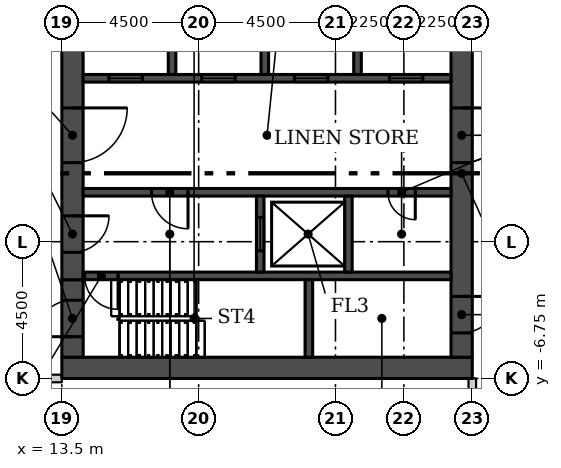
"""IFC4 building model, lengths in metres.
Left out: names, types, materials, properties, quantities, classifications, styles, units other than length and angle.
Written with IfcOpenShell. Run it as: python <this file> out.ifc"""

import sys

from ifc_helpers import new_model, si_unit, direction, frame, frame_2d, origin, place, context, subcontext, project, spatial, rectangle, extrude, element, fill, save


model = new_model("IFC4")
c1 = context("Model", 3, precision=1e-05, world=origin(), true_north=direction((0.0, 1.0)))
c2 = subcontext(c1, "Body", "Model", "MODEL_VIEW")
j1 = project(units=[si_unit("LENGTHUNIT", "METRE"), si_unit("PLANEANGLEUNIT", "RADIAN")], contexts=[c1])
p1 = place(None, origin())
s1 = spatial("IfcSite", under=j1, at=p1, CompositionType="ELEMENT")
p2 = place(p1, origin())
s2 = spatial("IfcBuilding", under=s1, at=p2, CompositionType="ELEMENT")
p3 = place(p2, origin())
s3 = spatial("IfcBuildingStorey", under=s2, at=p3, CompositionType="ELEMENT", Elevation=0.0)
p4 = place(p3, frame((27.0, -6.75, 0.0), z_axis=(0.0, 0.0, 1.0), x_axis=(0.0, -1.0, 0.0)))
e1 = element("IfcWall", 1, at=p4, inside=s3, PredefinedType="PARTITIONING", context=c2, shape_type="SweptSolid", body=[
    extrude(rectangle(XDim=22.375, YDim=0.25, at=frame_2d((11.188, 0.0))), origin(), (0.0, 0.0, 1.0), 12.1),
])
p5 = place(p4, frame((10.05, 0.0, 0.0)))
e2 = element("IfcOpeningElement", 2, at=p5, cuts=e1, PredefinedType="OPENING", context=c2, shape_type="SweptSolid", body=[
    extrude(rectangle(XDim=1.8, YDim=2.4, at=frame_2d((0.9, 1.2))), frame((0.0, 0.135, 0.0), z_axis=(0.0, -1.0, 0.0), x_axis=(1.0, 0.0, 0.0)), (0.0, 0.0, 1.0), 0.27),
])
p6 = place(p3, frame((-13.5, -6.75, 0.0)))
e3 = element("IfcWall", 3, at=p6, inside=s3, PredefinedType="PARTITIONING", context=c2, shape_type="SweptSolid", body=[
    extrude(rectangle(XDim=27.0, YDim=0.25, at=frame_2d((13.5, 0.0))), origin(), (0.0, 0.0, 1.0), 12.1),
])
p7 = place(p6, frame((14.25, 0.0, 0.0)))
e4 = element("IfcOpeningElement", 4, at=p7, cuts=e3, PredefinedType="OPENING", context=c2, shape_type="SweptSolid", body=[
    extrude(rectangle(XDim=1.8, YDim=2.4, at=frame_2d((0.9, 1.2))), frame((0.0, 0.135, 0.0), z_axis=(0.0, -1.0, 0.0), x_axis=(1.0, 0.0, 0.0)), (0.0, 0.0, 1.0), 0.27),
])
p8 = place(p3, frame((13.5, -6.4, 0.0)))
e5 = element("IfcWall", 5, at=p8, inside=s3, PredefinedType="SHEAR", context=c2, shape_type="SweptSolid", body=[
    extrude(rectangle(XDim=13.5, YDim=0.7, at=frame_2d((6.75, 0.0))), origin(), (0.0, 0.0, 1.0), 6.1),
])
p9 = place(p3, frame((13.85, -6.05, 0.0), z_axis=(0.0, 0.0, 1.0), x_axis=(0.0, 1.0, 0.0)))
e6 = element("IfcWall", 6, at=p9, inside=s3, PredefinedType="SHEAR", context=c2, shape_type="SweptSolid", body=[
    extrude(rectangle(XDim=2.55, YDim=0.7, at=frame_2d((1.275, 0.0))), origin(), (0.0, 0.0, 1.0), 6.1),
])
p10 = place(p9, frame((0.675, 0.0, 0.0)))
e7 = element("IfcOpeningElement", 7, at=p10, cuts=e6, PredefinedType="OPENING", context=c2, shape_type="SweptSolid", body=[
    extrude(rectangle(XDim=1.2, YDim=2.4, at=frame_2d((0.6, 1.2))), frame((0.0, 0.36, 0.0), z_axis=(0.0, -1.0, 0.0), x_axis=(1.0, 0.0, 0.0)), (0.0, 0.0, 1.0), 0.72),
])
p11 = place(p3, frame((13.85, 6.05, 0.0), z_axis=(0.0, 0.0, 1.0), x_axis=(0.0, -1.0, 0.0)))
e8 = element("IfcWall", 8, at=p11, inside=s3, PredefinedType="SHEAR", context=c2, shape_type="SweptSolid", body=[
    extrude(rectangle(XDim=9.55, YDim=0.7, at=frame_2d((4.775, 0.0))), origin(), (0.0, 0.0, 1.0), 6.1),
])
p12 = place(p11, frame((7.45, 0.0, 0.0)))
e9 = element("IfcOpeningElement", 9, at=p12, cuts=e8, PredefinedType="OPENING", context=c2, shape_type="SweptSolid", body=[
    extrude(rectangle(XDim=1.2, YDim=2.1, at=frame_2d((0.6, 1.05))), frame((0.0, 0.36, 0.0), z_axis=(0.0, -1.0, 0.0), x_axis=(1.0, 0.0, 0.0)), (0.0, 0.0, 1.0), 0.72),
])
p13 = place(p11, frame((3.9, 0.0, 0.0)))
e10 = element("IfcOpeningElement", 10, at=p13, cuts=e8, PredefinedType="OPENING", context=c2, shape_type="SweptSolid", body=[
    extrude(rectangle(XDim=1.8, YDim=2.4, at=frame_2d((0.9, 1.2))), frame((0.0, 0.36, 0.0), z_axis=(0.0, -1.0, 0.0), x_axis=(1.0, 0.0, 0.0)), (0.0, 0.0, 1.0), 0.72),
])
p14 = place(p3, frame((26.65, 6.05, 0.0), z_axis=(0.0, 0.0, 1.0), x_axis=(0.0, -1.0, 0.0)))
e11 = element("IfcWall", 11, at=p14, inside=s3, PredefinedType="SHEAR", context=c2, shape_type="SweptSolid", body=[
    extrude(rectangle(XDim=12.1, YDim=0.7, at=frame_2d((6.05, 0.0))), origin(), (0.0, 0.0, 1.0), 6.1),
])
p15 = place(p14, frame((10.1, 0.0, 0.0)))
e12 = element("IfcOpeningElement", 12, at=p15, cuts=e11, PredefinedType="OPENING", context=c2, shape_type="SweptSolid", body=[
    extrude(rectangle(XDim=1.2, YDim=2.1, at=frame_2d((0.6, 1.05))), frame((0.0, 0.36, 0.0), z_axis=(0.0, -1.0, 0.0), x_axis=(1.0, 0.0, 0.0)), (0.0, 0.0, 1.0), 0.72),
])
p16 = place(p14, frame((3.9, 0.0, 0.0)))
e13 = element("IfcOpeningElement", 13, at=p16, cuts=e11, PredefinedType="OPENING", context=c2, shape_type="SweptSolid", body=[
    extrude(rectangle(XDim=1.8, YDim=2.4, at=frame_2d((0.9, 1.2))), frame((0.0, 0.36, 0.0), z_axis=(0.0, -1.0, 0.0), x_axis=(1.0, 0.0, 0.0)), (0.0, 0.0, 1.0), 0.72),
])
p17 = place(p3, frame((26.3, -3.375, 0.0), z_axis=(0.0, 0.0, 1.0), x_axis=(-1.0, 0.0, 0.0)))
e14 = element("IfcWall", 14, at=p17, inside=s3, PredefinedType="SHEAR", context=c2, shape_type="SweptSolid", body=[
    extrude(rectangle(XDim=12.1, YDim=0.25, at=frame_2d((6.05, 0.0))), origin(), (0.0, 0.0, 1.0), 6.1),
])
p18 = place(p17, frame((10.95, 0.0, 0.0)))
e15 = element("IfcOpeningElement", 15, at=p18, cuts=e14, PredefinedType="OPENING", context=c2, shape_type="SweptSolid", body=[
    extrude(rectangle(XDim=1.1, YDim=2.1, at=frame_2d((0.55, 1.05))), frame((0.0, 0.135, 0.0), z_axis=(0.0, -1.0, 0.0), x_axis=(1.0, 0.0, 0.0)), (0.0, 0.0, 1.0), 0.27),
])
p19 = place(p3, frame((21.625, -6.05, 0.0), z_axis=(0.0, 0.0, 1.0), x_axis=(0.0, 1.0, 0.0)))
e16 = element("IfcWall", 16, at=p19, inside=s3, PredefinedType="SHEAR", context=c2, shape_type="SweptSolid", body=[
    extrude(rectangle(XDim=2.55, YDim=0.25, at=frame_2d((1.275, 0.0))), origin(), (0.0, 0.0, 1.0), 6.1),
])
p20 = place(p3, frame((26.3, -0.625, 0.0), z_axis=(0.0, 0.0, 1.0), x_axis=(-1.0, 0.0, 0.0)))
e17 = element("IfcWall", 17, at=p20, inside=s3, PredefinedType="SHEAR", context=c2, shape_type="SweptSolid", body=[
    extrude(rectangle(XDim=12.1, YDim=0.25, at=frame_2d((6.05, 0.0))), origin(), (0.0, 0.0, 1.0), 6.1),
])
p21 = place(p20, frame((8.65, 0.0, 0.0)))
e18 = element("IfcOpeningElement", 18, at=p21, cuts=e17, PredefinedType="OPENING", context=c2, shape_type="SweptSolid", body=[
    extrude(rectangle(XDim=1.2, YDim=2.1, at=frame_2d((0.6, 1.05))), frame((0.0, 0.135, 0.0), z_axis=(0.0, -1.0, 0.0), x_axis=(1.0, 0.0, 0.0)), (0.0, 0.0, 1.0), 0.27),
])
p22 = place(p20, frame((1.175, 0.0, 0.0)))
e19 = element("IfcOpeningElement", 19, at=p22, cuts=e17, PredefinedType="OPENING", context=c2, shape_type="SweptSolid", body=[
    extrude(rectangle(XDim=0.9, YDim=2.1, at=frame_2d((0.45, 1.05))), frame((0.0, 0.135, 0.0), z_axis=(0.0, -1.0, 0.0), x_axis=(1.0, 0.0, 0.0)), (0.0, 0.0, 1.0), 0.27),
])
p23 = place(p3, frame((20.025, -3.25, 0.0), z_axis=(0.0, 0.0, 1.0), x_axis=(0.0, 1.0, 0.0)))
e20 = element("IfcWall", 20, at=p23, inside=s3, PredefinedType="SHEAR", context=c2, shape_type="SweptSolid", body=[
    extrude(rectangle(XDim=2.5, YDim=0.25, at=frame_2d((1.25, 0.0))), origin(), (0.0, 0.0, 1.0), 6.1),
])
p24 = place(p23, frame((0.7, 0.0, 0.0)))
e21 = element("IfcOpeningElement", 21, at=p24, cuts=e20, PredefinedType="OPENING", context=c2, shape_type="SweptSolid", body=[
    extrude(rectangle(XDim=1.1, YDim=2.1, at=frame_2d((0.55, 1.05))), frame((0.0, 0.135, 0.0), z_axis=(0.0, -1.0, 0.0), x_axis=(1.0, 0.0, 0.0)), (0.0, 0.0, 1.0), 0.27),
])
p25 = place(p3, frame((22.925, -3.25, 0.0), z_axis=(0.0, 0.0, 1.0), x_axis=(0.0, 1.0, 0.0)))
e22 = element("IfcWall", 22, at=p25, inside=s3, PredefinedType="SHEAR", context=c2, shape_type="SweptSolid", body=[
    extrude(rectangle(XDim=2.5, YDim=0.25, at=frame_2d((1.25, 0.0))), origin(), (0.0, 0.0, 1.0), 6.1),
])
p26 = place(p3, frame((14.2, 3.125, 0.0)))
e23 = element("IfcWall", 23, at=p26, inside=s3, PredefinedType="SHEAR", context=c2, shape_type="SweptSolid", body=[
    extrude(rectangle(XDim=12.1, YDim=0.25, at=frame_2d((6.05, 0.0))), origin(), (0.0, 0.0, 1.0), 6.1),
])
p27 = place(p26, frame((0.85, 0.0, 0.0)))
e24 = element("IfcOpeningElement", 24, at=p27, cuts=e23, PredefinedType="OPENING", context=c2, shape_type="SweptSolid", body=[
    extrude(rectangle(XDim=1.1, YDim=2.1, at=frame_2d((0.55, 1.05))), frame((0.0, 0.135, 0.0), z_axis=(0.0, -1.0, 0.0), x_axis=(1.0, 0.0, 0.0)), (0.0, 0.0, 1.0), 0.27),
])
p28 = place(p26, frame((3.9, 0.0, 0.0)))
e25 = element("IfcOpeningElement", 25, at=p28, cuts=e23, PredefinedType="OPENING", context=c2, shape_type="SweptSolid", body=[
    extrude(rectangle(XDim=1.1, YDim=2.1, at=frame_2d((0.55, 1.05))), frame((0.0, 0.135, 0.0), z_axis=(0.0, -1.0, 0.0), x_axis=(1.0, 0.0, 0.0)), (0.0, 0.0, 1.0), 0.27),
])
p29 = place(p26, frame((6.95, 0.0, 0.0)))
e26 = element("IfcOpeningElement", 26, at=p29, cuts=e23, PredefinedType="OPENING", context=c2, shape_type="SweptSolid", body=[
    extrude(rectangle(XDim=1.1, YDim=2.1, at=frame_2d((0.55, 1.05))), frame((0.0, 0.135, 0.0), z_axis=(0.0, -1.0, 0.0), x_axis=(1.0, 0.0, 0.0)), (0.0, 0.0, 1.0), 0.27),
])
p30 = place(p26, frame((10.075, 0.0, 0.0)))
e27 = element("IfcOpeningElement", 27, at=p30, cuts=e23, PredefinedType="OPENING", context=c2, shape_type="SweptSolid", body=[
    extrude(rectangle(XDim=1.1, YDim=2.1, at=frame_2d((0.55, 1.05))), frame((0.0, 0.135, 0.0), z_axis=(0.0, -1.0, 0.0), x_axis=(1.0, 0.0, 0.0)), (0.0, 0.0, 1.0), 0.27),
])
for number, where, z_axis, x_axis in (
    (28, (17.125, 3.25, 0.0), (0.0, 0.0, 1.0), (0.0, 1.0, 0.0)),
    (29, (20.175, 3.25, 0.0), (0.0, 0.0, 1.0), (0.0, 1.0, 0.0)),
    (30, (23.225, 3.25, 0.0), (0.0, 0.0, 1.0), (0.0, 1.0, 0.0)),
):
    element("IfcWall", number, at=place(p3, frame(where, z_axis=z_axis, x_axis=x_axis)), inside=s3, PredefinedType="SHEAR", context=c2, shape_type="SweptSolid", body=[
        extrude(rectangle(XDim=2.8, YDim=0.25, at=frame_2d((1.4, 0.0))), origin(), (0.0, 0.0, 1.0), 6.1),
    ])
p31 = place(p10, origin())
e31 = element("IfcDoor", 31, at=p31, inside=s3, OperationType="SINGLE_SWING_LEFT", PredefinedType="DOOR", context=c2, shape_type="SweptSolid", body=[
    extrude(rectangle(XDim=1.2, YDim=2.4, at=frame_2d((0.6, 1.2))), frame((0.0, 0.025, 0.0), z_axis=(0.0, -1.0, 0.0), x_axis=(1.0, 0.0, 0.0)), (0.0, 0.0, 1.0), 0.05),
])
fill(e7, e31)
p32 = place(p12, origin())
e32 = element("IfcDoor", 32, at=p32, inside=s3, OperationType="SINGLE_SWING_RIGHT", PredefinedType="DOOR", context=c2, shape_type="SweptSolid", body=[
    extrude(rectangle(XDim=1.2, YDim=2.1, at=frame_2d((0.6, 1.05))), frame((0.0, 0.025, 0.0), z_axis=(0.0, -1.0, 0.0), x_axis=(1.0, 0.0, 0.0)), (0.0, 0.0, 1.0), 0.05),
])
fill(e9, e32)
p33 = place(p13, origin())
e33 = element("IfcDoor", 33, at=p33, inside=s3, OperationType="DOUBLE_DOOR_SINGLE_SWING", PredefinedType="DOOR", context=c2, shape_type="SweptSolid", body=[
    extrude(rectangle(XDim=1.8, YDim=2.4, at=frame_2d((0.9, 1.2))), frame((0.0, 0.025, 0.0), z_axis=(0.0, -1.0, 0.0), x_axis=(1.0, 0.0, 0.0)), (0.0, 0.0, 1.0), 0.05),
])
fill(e10, e33)
p34 = place(p15, origin())
e34 = element("IfcDoor", 34, at=p34, inside=s3, OperationType="SINGLE_SWING_RIGHT", PredefinedType="DOOR", context=c2, shape_type="SweptSolid", body=[
    extrude(rectangle(XDim=1.2, YDim=2.1, at=frame_2d((0.6, 1.05))), frame((0.0, 0.025, 0.0), z_axis=(0.0, -1.0, 0.0), x_axis=(1.0, 0.0, 0.0)), (0.0, 0.0, 1.0), 0.05),
])
fill(e12, e34)
p35 = place(p16, origin())
e35 = element("IfcDoor", 35, at=p35, inside=s3, OperationType="DOUBLE_DOOR_SINGLE_SWING", PredefinedType="DOOR", context=c2, shape_type="SweptSolid", body=[
    extrude(rectangle(XDim=1.8, YDim=2.4, at=frame_2d((0.9, 1.2))), frame((0.0, 0.025, 0.0), z_axis=(0.0, -1.0, 0.0), x_axis=(1.0, 0.0, 0.0)), (0.0, 0.0, 1.0), 0.05),
])
fill(e13, e35)
p36 = place(p18, origin())
e36 = element("IfcDoor", 36, at=p36, inside=s3, OperationType="SINGLE_SWING_RIGHT", PredefinedType="DOOR", context=c2, shape_type="SweptSolid", body=[
    extrude(rectangle(XDim=1.1, YDim=2.1, at=frame_2d((0.55, 1.05))), frame((0.0, 0.025, 0.0), z_axis=(0.0, -1.0, 0.0), x_axis=(1.0, 0.0, 0.0)), (0.0, 0.0, 1.0), 0.05),
])
fill(e15, e36)
p37 = place(p21, origin())
e37 = element("IfcDoor", 37, at=p37, inside=s3, OperationType="SINGLE_SWING_RIGHT", PredefinedType="DOOR", context=c2, shape_type="SweptSolid", body=[
    extrude(rectangle(XDim=1.2, YDim=2.1, at=frame_2d((0.6, 1.05))), frame((0.0, 0.025, 0.0), z_axis=(0.0, -1.0, 0.0), x_axis=(1.0, 0.0, 0.0)), (0.0, 0.0, 1.0), 0.05),
])
fill(e18, e37)
p38 = place(p22, origin())
e38 = element("IfcDoor", 38, at=p38, inside=s3, OperationType="SINGLE_SWING_LEFT", PredefinedType="DOOR", context=c2, shape_type="SweptSolid", body=[
    extrude(rectangle(XDim=0.9, YDim=2.1, at=frame_2d((0.45, 1.05))), frame((0.0, 0.025, 0.0), z_axis=(0.0, -1.0, 0.0), x_axis=(1.0, 0.0, 0.0)), (0.0, 0.0, 1.0), 0.05),
])
fill(e19, e38)
p39 = place(p24, origin())
e39 = element("IfcDoor", 39, at=p39, inside=s3, OperationType="SLIDING_TO_LEFT", PredefinedType="DOOR", context=c2, shape_type="SweptSolid", body=[
    extrude(rectangle(XDim=1.1, YDim=2.1, at=frame_2d((0.55, 1.05))), frame((0.0, 0.025, 0.0), z_axis=(0.0, -1.0, 0.0), x_axis=(1.0, 0.0, 0.0)), (0.0, 0.0, 1.0), 0.05),
])
fill(e21, e39)
p40 = place(p27, origin())
e40 = element("IfcDoor", 40, at=p40, inside=s3, OperationType="SLIDING_TO_LEFT", PredefinedType="DOOR", context=c2, shape_type="SweptSolid", body=[
    extrude(rectangle(XDim=1.1, YDim=2.1, at=frame_2d((0.55, 1.05))), frame((0.0, 0.025, 0.0), z_axis=(0.0, -1.0, 0.0), x_axis=(1.0, 0.0, 0.0)), (0.0, 0.0, 1.0), 0.05),
])
fill(e24, e40)
p41 = place(p28, origin())
e41 = element("IfcDoor", 41, at=p41, inside=s3, OperationType="SLIDING_TO_LEFT", PredefinedType="DOOR", context=c2, shape_type="SweptSolid", body=[
    extrude(rectangle(XDim=1.1, YDim=2.1, at=frame_2d((0.55, 1.05))), frame((0.0, 0.025, 0.0), z_axis=(0.0, -1.0, 0.0), x_axis=(1.0, 0.0, 0.0)), (0.0, 0.0, 1.0), 0.05),
])
fill(e25, e41)
p42 = place(p29, origin())
e42 = element("IfcDoor", 42, at=p42, inside=s3, OperationType="SLIDING_TO_LEFT", PredefinedType="DOOR", context=c2, shape_type="SweptSolid", body=[
    extrude(rectangle(XDim=1.1, YDim=2.1, at=frame_2d((0.55, 1.05))), frame((0.0, 0.025, 0.0), z_axis=(0.0, -1.0, 0.0), x_axis=(1.0, 0.0, 0.0)), (0.0, 0.0, 1.0), 0.05),
])
fill(e26, e42)
p43 = place(p30, origin())
e43 = element("IfcDoor", 43, at=p43, inside=s3, OperationType="SLIDING_TO_LEFT", PredefinedType="DOOR", context=c2, shape_type="SweptSolid", body=[
    extrude(rectangle(XDim=1.1, YDim=2.1, at=frame_2d((0.55, 1.05))), frame((0.0, 0.025, 0.0), z_axis=(0.0, -1.0, 0.0), x_axis=(1.0, 0.0, 0.0)), (0.0, 0.0, 1.0), 0.05),
])
fill(e27, e43)
save(model, sys.argv[1])
